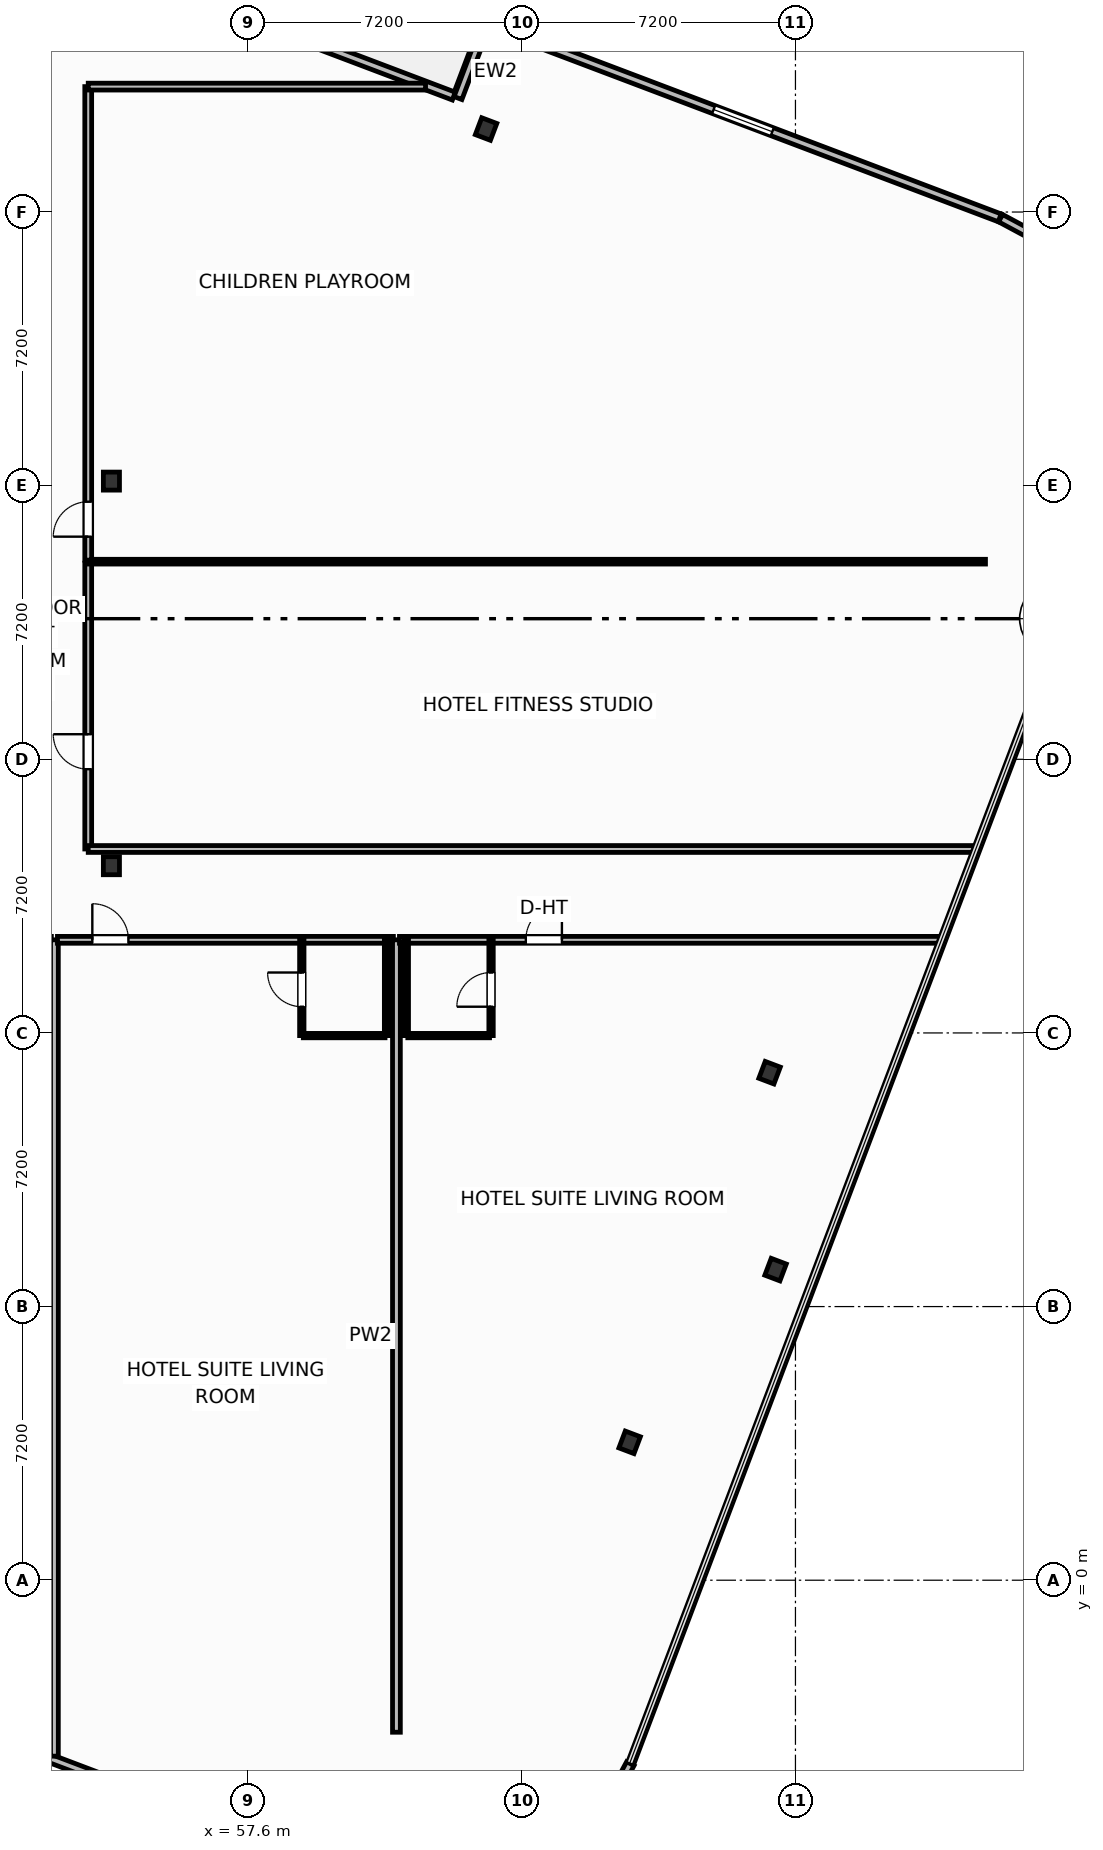
"""IFC4 building model, lengths in metres.
Left out: names, types, materials, properties, quantities, classifications, styles, units other than length and angle.
Written with IfcOpenShell. Run it as: python <this file> out.ifc"""

import sys

from ifc_helpers import new_model, si_unit, direction, frame, frame_2d, origin, origin_2d, place, context, subcontext, project, spatial, rectangle, i_section, extrude, element, fill, save


model = new_model("IFC4")
c1 = context("Model", 3, precision=1e-05, world=origin(), true_north=direction((0.0, 1.0)))
c2 = subcontext(c1, "Body", "Model", "MODEL_VIEW")
j1 = project(units=[si_unit("LENGTHUNIT", "METRE"), si_unit("PLANEANGLEUNIT", "RADIAN")], contexts=[c1])
p1 = place(None, origin())
s1 = spatial("IfcSite", under=j1, at=p1, CompositionType="ELEMENT")
p2 = place(p1, origin())
s2 = spatial("IfcBuilding", under=s1, at=p2, CompositionType="ELEMENT")
p3 = place(p2, frame((0.0, 0.0, 83.6)))
s3 = spatial("IfcBuildingStorey", under=s2, at=p3, CompositionType="ELEMENT", Elevation=83.6)
for number, where, z_axis, x_axis in (
    (1, (54.0, 18.8, 0.0), (0.0, 0.0, 1.0), (1.0, 0.0, 0.0)),
    (2, (54.0, 28.92, 0.0), (0.0, 0.0, 1.0), (1.0, 0.0, 0.0)),
    (3, (67.637, 3.628, 0.0), (0.0, 0.0, 1.0), (0.935, -0.354, 0.0)),
    (4, (71.477, 8.173, 0.0), (0.0, 0.0, 1.0), (0.935, -0.354, 0.0)),
    (5, (71.319, 13.354, 0.0), (0.0, 0.0, 1.0), (0.935, -0.354, 0.0)),
    (6, (63.859, 38.184, 0.0), (0.0, 0.0, 1.0), (0.935, -0.354, 0.0)),
):
    element("IfcColumn", number, at=place(p3, frame(where, z_axis=z_axis, x_axis=x_axis)), inside=s3, PredefinedType="COLUMN", context=c2, shape_type="SweptSolid", body=[
        extrude(i_section(OverallWidth=0.424, OverallDepth=0.474, WebThickness=0.048, FlangeThickness=0.077, FilletRadius=0.025, at=origin_2d()), origin(), (0.0, 0.0, 1.0), 3.7),
    ])
p4 = place(p3, frame((57.399, 41.175, 0.0), z_axis=(0.0, 0.0, 1.0), x_axis=(0.935227640088, -0.354046976001, 0.0)))
e7 = element("IfcWall", 7, at=p4, inside=s3, PredefinedType="SOLIDWALL", context=c2, shape_type="SweptSolid", body=[
    extrude(rectangle(XDim=6.0, YDim=0.22, at=frame_2d((3.0, 0.0))), origin(), (0.0, 0.0, 1.0), 2.73),
])
p5 = place(p4, frame((0.4, 0.0, 0.0)))
e8 = element("IfcOpeningElement", 8, at=p5, cuts=e7, PredefinedType="OPENING", context=c2, shape_type="SweptSolid", body=[
    extrude(rectangle(XDim=1.5, YDim=2.25, at=frame_2d((0.75, 1.125))), frame((0.0, 0.12, 0.0), z_axis=(0.0, -1.0, 0.0), x_axis=(1.0, 0.0, 0.0)), (0.0, 0.0, 1.0), 0.24),
])
p6 = place(p3, frame((47.424, -2.813, 0.0), z_axis=(0.0, 0.0, 1.0), x_axis=(0.935225962032, -0.354051408614, 0.0)))
e9 = element("IfcWall", 9, at=p6, inside=s3, PredefinedType="SOLIDWALL", context=c2, shape_type="SweptSolid", body=[
    extrude(rectangle(XDim=14.347, YDim=0.22, at=frame_2d((7.173, 0.0))), origin(), (0.0, 0.0, 1.0), 2.73),
])
p7 = place(p6, frame((6.348, 0.0, 0.8)))
e10 = element("IfcOpeningElement", 10, at=p7, cuts=e9, PredefinedType="OPENING", context=c2, shape_type="SweptSolid", body=[
    extrude(rectangle(XDim=1.65, YDim=1.65, at=frame_2d((0.825, 0.825))), frame((0.0, 0.12, 0.0), z_axis=(0.0, -1.0, 0.0), x_axis=(1.0, 0.0, 0.0)), (0.0, 0.0, 1.0), 0.24),
])
p8 = place(p3, frame((67.015, -6.019, 0.0), z_axis=(0.0, 0.0, 1.0), x_axis=(0.473077364598, 0.881020889142, 0.0)))
e11 = element("IfcWall", 11, at=p8, inside=s3, PredefinedType="SOLIDWALL", context=c2, shape_type="SweptSolid", body=[
    extrude(rectangle(XDim=1.353, YDim=0.22, at=frame_2d((0.677, 0.0))), origin(), (0.0, 0.0, 1.0), 2.73),
])
p9 = place(p3, frame((78.597, 35.194, 0.0), z_axis=(0.0, 0.0, 1.0), x_axis=(-0.880948732004, 0.473211719614, 0.0)))
e12 = element("IfcWall", 12, at=p9, inside=s3, PredefinedType="SOLIDWALL", context=c2, shape_type="SweptSolid", body=[
    extrude(rectangle(XDim=1.361, YDim=0.22, at=frame_2d((0.681, 0.0))), origin(), (0.0, 0.0, 1.0), 2.73),
])
p10 = place(p3, frame((77.375, 35.847, 0.0), z_axis=(0.0, 0.0, 1.0), x_axis=(-0.935222448475, 0.354060689526, 0.0)))
e13 = element("IfcWall", 13, at=p10, inside=s3, PredefinedType="SOLIDWALL", context=c2, shape_type="SweptSolid", body=[
    extrude(rectangle(XDim=14.447, YDim=0.22, at=frame_2d((7.224, 0.0))), origin(), (0.0, 0.0, 1.0), 2.73),
])
p11 = place(p10, frame((6.399, 0.0, 0.8)))
e14 = element("IfcOpeningElement", 14, at=p11, cuts=e13, PredefinedType="OPENING", context=c2, shape_type="SweptSolid", body=[
    extrude(rectangle(XDim=1.65, YDim=1.65, at=frame_2d((0.825, 0.825))), frame((0.0, 0.12, 0.0), z_axis=(0.0, -1.0, 0.0), x_axis=(1.0, 0.0, 0.0)), (0.0, 0.0, 1.0), 0.24),
])
p12 = place(p3, frame((63.819, 40.845, 0.0), z_axis=(0.0, 0.0, 1.0), x_axis=(-0.354128791944, -0.935196663123, 0.0)))
e15 = element("IfcWall", 15, at=p12, inside=s3, PredefinedType="SOLIDWALL", context=c2, shape_type="SweptSolid", body=[
    extrude(rectangle(XDim=1.975, YDim=0.22, at=frame_2d((0.988, 0.0))), origin(), (0.0, 0.0, 1.0), 2.73),
])
p13 = place(p3, frame((52.5, -4.63, 0.0), z_axis=(0.0, 0.0, 1.0), x_axis=(0.0, 1.0, 0.0)))
e16 = element("IfcWall", 16, at=p13, inside=s3, PredefinedType="PARTITIONING", context=c2, shape_type="SweptSolid", body=[
    extrude(rectangle(XDim=21.48, YDim=0.205, at=frame_2d((10.74, 0.0))), origin(), (0.0, 0.0, 1.0), 2.58),
])
p14 = place(p3, frame((52.58, 16.85, 0.0), z_axis=(0.0, 0.0, 1.0), x_axis=(1.0, 0.0, 0.0)))
e17 = element("IfcWall", 17, at=p14, inside=s3, PredefinedType="PARTITIONING", context=c2, shape_type="SweptSolid", body=[
    extrude(rectangle(XDim=8.84, YDim=0.18, at=frame_2d((4.42, 0.0))), origin(), (0.0, 0.0, 1.0), 2.58),
])
p15 = place(p14, frame((0.918, 0.0, 0.0)))
e18 = element("IfcOpeningElement", 18, at=p15, cuts=e17, PredefinedType="OPENING", context=c2, shape_type="SweptSolid", body=[
    extrude(rectangle(XDim=0.95, YDim=2.15, at=frame_2d((0.475, 1.075))), frame((0.0, 0.1, 0.0), z_axis=(0.0, -1.0, 0.0), x_axis=(1.0, 0.0, 0.0)), (0.0, 0.0, 1.0), 0.2),
])
p16 = place(p3, frame((59.05, 14.33, 0.0), z_axis=(0.0, 0.0, 1.0), x_axis=(1.0, 0.0, 0.0)))
e19 = element("IfcWall", 19, at=p16, inside=s3, PredefinedType="PARTITIONING", context=c2, shape_type="SweptSolid", body=[
    extrude(rectangle(XDim=2.15, YDim=0.115, at=frame_2d((1.075, 0.0))), origin(), (0.0, 0.0, 1.0), 3.45),
])
p17 = place(p3, frame((59.01, 14.33, 0.0), z_axis=(0.0, 0.0, 1.0), x_axis=(0.0, 1.0, 0.0)))
e20 = element("IfcWall", 20, at=p17, inside=s3, PredefinedType="PARTITIONING", context=c2, shape_type="SweptSolid", body=[
    extrude(rectangle(XDim=2.52, YDim=0.115, at=frame_2d((1.26, 0.0))), origin(), (0.0, 0.0, 1.0), 3.45),
])
p18 = place(p17, frame((0.76, 0.0, 0.0)))
e21 = element("IfcOpeningElement", 21, at=p18, cuts=e20, PredefinedType="OPENING", context=c2, shape_type="SweptSolid", body=[
    extrude(rectangle(XDim=0.9, YDim=2.05, at=frame_2d((0.45, 1.025))), frame((0.0, 0.067, 0.0), z_axis=(0.0, -1.0, 0.0), x_axis=(1.0, 0.0, 0.0)), (0.0, 0.0, 1.0), 0.135),
])
p19 = place(p3, frame((61.24, 14.33, 0.0), z_axis=(0.0, 0.0, 1.0), x_axis=(0.0, 1.0, 0.0)))
e22 = element("IfcWall", 22, at=p19, inside=s3, PredefinedType="PARTITIONING", context=c2, shape_type="SweptSolid", body=[
    extrude(rectangle(XDim=2.52, YDim=0.115, at=frame_2d((1.26, 0.0))), origin(), (0.0, 0.0, 1.0), 3.45),
])
p20 = place(p3, frame((61.5, -4.0, 0.0), z_axis=(0.0, 0.0, 1.0), x_axis=(0.0, 1.0, 0.0)))
e23 = element("IfcWall", 23, at=p20, inside=s3, PredefinedType="PARTITIONING", context=c2, shape_type="SweptSolid", body=[
    extrude(rectangle(XDim=20.85, YDim=0.205, at=frame_2d((10.425, 0.0))), origin(), (0.0, 0.0, 1.0), 3.45),
])
p21 = place(p3, frame((61.58, 16.85, 0.0), z_axis=(0.0, 0.0, 1.0), x_axis=(1.0, 0.0, 0.0)))
e24 = element("IfcWall", 24, at=p21, inside=s3, PredefinedType="PARTITIONING", context=c2, shape_type="SweptSolid", body=[
    extrude(rectangle(XDim=14.222, YDim=0.18, at=frame_2d((7.111, 0.0))), origin(), (0.0, 0.0, 1.0), 3.45),
])
p22 = place(p21, frame((3.325, 0.0, 0.0)))
e25 = element("IfcOpeningElement", 25, at=p22, cuts=e24, PredefinedType="OPENING", context=c2, shape_type="SweptSolid", body=[
    extrude(rectangle(XDim=0.95, YDim=2.15, at=frame_2d((0.475, 1.075))), frame((0.0, 0.1, 0.0), z_axis=(0.0, -1.0, 0.0), x_axis=(1.0, 0.0, 0.0)), (0.0, 0.0, 1.0), 0.2),
])
p23 = place(p3, frame((61.8, 14.33, 0.0), z_axis=(0.0, 0.0, 1.0), x_axis=(1.0, 0.0, 0.0)))
e26 = element("IfcWall", 26, at=p23, inside=s3, PredefinedType="PARTITIONING", context=c2, shape_type="SweptSolid", body=[
    extrude(rectangle(XDim=2.15, YDim=0.115, at=frame_2d((1.075, 0.0))), origin(), (0.0, 0.0, 1.0), 3.45),
])
p24 = place(p3, frame((63.99, 14.33, 0.0), z_axis=(0.0, 0.0, 1.0), x_axis=(0.0, 1.0, 0.0)))
e27 = element("IfcWall", 27, at=p24, inside=s3, PredefinedType="PARTITIONING", context=c2, shape_type="SweptSolid", body=[
    extrude(rectangle(XDim=2.52, YDim=0.115, at=frame_2d((1.26, 0.0))), origin(), (0.0, 0.0, 1.0), 3.45),
])
p25 = place(p24, frame((0.76, 0.0, 0.0)))
e28 = element("IfcOpeningElement", 28, at=p25, cuts=e27, PredefinedType="OPENING", context=c2, shape_type="SweptSolid", body=[
    extrude(rectangle(XDim=0.9, YDim=2.05, at=frame_2d((0.45, 1.025))), frame((0.0, 0.067, 0.0), z_axis=(0.0, -1.0, 0.0), x_axis=(1.0, 0.0, 0.0)), (0.0, 0.0, 1.0), 0.135),
])
p26 = place(p3, frame((61.76, 14.33, 0.0), z_axis=(0.0, 0.0, 1.0), x_axis=(0.0, 1.0, 0.0)))
e29 = element("IfcWall", 29, at=p26, inside=s3, PredefinedType="PARTITIONING", context=c2, shape_type="SweptSolid", body=[
    extrude(rectangle(XDim=2.52, YDim=0.115, at=frame_2d((1.26, 0.0))), origin(), (0.0, 0.0, 1.0), 3.45),
])
p27 = place(p3, frame((53.39, 19.24, 0.0), z_axis=(0.0, 0.0, 1.0), x_axis=(0.0, 1.0, 0.0)))
e30 = element("IfcWall", 30, at=p27, inside=s3, PredefinedType="PARTITIONING", context=c2, shape_type="SweptSolid", body=[
    extrude(rectangle(XDim=7.52, YDim=0.18, at=frame_2d((3.76, 0.0))), origin(), (0.0, 0.0, 1.0), 3.45),
])
p28 = place(p27, frame((2.1, 0.0, 0.0)))
e31 = element("IfcOpeningElement", 31, at=p28, cuts=e30, PredefinedType="OPENING", context=c2, shape_type="SweptSolid", body=[
    extrude(rectangle(XDim=0.92, YDim=2.05, at=frame_2d((0.46, 1.025))), frame((0.0, 0.1, 0.0), z_axis=(0.0, -1.0, 0.0), x_axis=(1.0, 0.0, 0.0)), (0.0, 0.0, 1.0), 0.2),
])
p29 = place(p3, frame((53.39, 26.8, 0.0), z_axis=(0.0, 0.0, 1.0), x_axis=(1.0, 0.0, 0.0)))
e32 = element("IfcWall", 32, at=p29, inside=s3, PredefinedType="PARTITIONING", context=c2, shape_type="SweptSolid", body=[
    extrude(rectangle(XDim=23.61, YDim=0.125, at=frame_2d((11.805, 0.0))), origin(), (0.0, 0.0, 1.0), 3.45),
])
p30 = place(p3, frame((53.39, 19.24, 0.0), z_axis=(0.0, 0.0, 1.0), x_axis=(1.0, 0.0, 0.0)))
e33 = element("IfcWall", 33, at=p30, inside=s3, PredefinedType="PARTITIONING", context=c2, shape_type="SweptSolid", body=[
    extrude(rectangle(XDim=23.317, YDim=0.18, at=frame_2d((11.658, 0.0))), origin(), (0.0, 0.0, 1.0), 3.45),
])
p31 = place(p3, frame((53.39, 26.84, 0.0), z_axis=(0.0, 0.0, 1.0), x_axis=(0.0, 1.0, 0.0)))
e34 = element("IfcWall", 34, at=p31, inside=s3, PredefinedType="PARTITIONING", context=c2, shape_type="SweptSolid", body=[
    extrude(rectangle(XDim=12.46, YDim=0.18, at=frame_2d((6.23, 0.0))), origin(), (0.0, 0.0, 1.0), 3.45),
])
p32 = place(p31, frame((0.618, 0.0, 0.0)))
e35 = element("IfcOpeningElement", 35, at=p32, cuts=e34, PredefinedType="OPENING", context=c2, shape_type="SweptSolid", body=[
    extrude(rectangle(XDim=0.92, YDim=2.05, at=frame_2d((0.46, 1.025))), frame((0.0, 0.1, 0.0), z_axis=(0.0, -1.0, 0.0), x_axis=(1.0, 0.0, 0.0)), (0.0, 0.0, 1.0), 0.2),
])
p33 = place(p3, frame((53.39, 39.3, 0.0), z_axis=(0.0, 0.0, 1.0), x_axis=(1.0, 0.0, 0.0)))
e36 = element("IfcWall", 36, at=p33, inside=s3, PredefinedType="PARTITIONING", context=c2, shape_type="SweptSolid", body=[
    extrude(rectangle(XDim=8.876, YDim=0.18, at=frame_2d((4.438, 0.0))), origin(), (0.0, 0.0, 1.0), 3.45),
])
p34 = place(p11, origin())
e37 = element("IfcWindow", 37, at=p34, inside=s3, PartitioningType="SINGLE_PANEL", PredefinedType="WINDOW", context=c2, shape_type="SweptSolid", body=[
    extrude(rectangle(XDim=1.65, YDim=1.65, at=frame_2d((0.825, 0.825))), frame((0.0, 0.03, 0.0), z_axis=(0.0, -1.0, 0.0), x_axis=(1.0, 0.0, 0.0)), (0.0, 0.0, 1.0), 0.06),
])
fill(e14, e37)
p35 = place(p15, origin())
e38 = element("IfcDoor", 38, at=p35, inside=s3, OperationType="SINGLE_SWING_LEFT", PredefinedType="DOOR", context=c2, shape_type="SweptSolid", body=[
    extrude(rectangle(XDim=0.95, YDim=2.15, at=frame_2d((0.475, 1.075))), frame((0.0, 0.025, 0.0), z_axis=(0.0, -1.0, 0.0), x_axis=(1.0, 0.0, 0.0)), (0.0, 0.0, 1.0), 0.05),
])
fill(e18, e38)
p36 = place(p18, origin())
e39 = element("IfcDoor", 39, at=p36, inside=s3, OperationType="SINGLE_SWING_RIGHT", PredefinedType="DOOR", context=c2, shape_type="SweptSolid", body=[
    extrude(rectangle(XDim=0.9, YDim=2.05, at=frame_2d((0.45, 1.025))), frame((0.0, 0.025, 0.0), z_axis=(0.0, -1.0, 0.0), x_axis=(1.0, 0.0, 0.0)), (0.0, 0.0, 1.0), 0.05),
])
fill(e21, e39)
p37 = place(p22, origin())
e40 = element("IfcDoor", 40, at=p37, inside=s3, OperationType="SINGLE_SWING_RIGHT", PredefinedType="DOOR", context=c2, shape_type="SweptSolid", body=[
    extrude(rectangle(XDim=0.95, YDim=2.15, at=frame_2d((0.475, 1.075))), frame((0.0, 0.025, 0.0), z_axis=(0.0, -1.0, 0.0), x_axis=(1.0, 0.0, 0.0)), (0.0, 0.0, 1.0), 0.05),
])
fill(e25, e40)
p38 = place(p25, origin())
e41 = element("IfcDoor", 41, at=p38, inside=s3, OperationType="SINGLE_SWING_LEFT", PredefinedType="DOOR", context=c2, shape_type="SweptSolid", body=[
    extrude(rectangle(XDim=0.9, YDim=2.05, at=frame_2d((0.45, 1.025))), frame((0.0, 0.025, 0.0), z_axis=(0.0, -1.0, 0.0), x_axis=(1.0, 0.0, 0.0)), (0.0, 0.0, 1.0), 0.05),
])
fill(e28, e41)
p39 = place(p28, origin())
e42 = element("IfcDoor", 42, at=p39, inside=s3, OperationType="SINGLE_SWING_RIGHT", PredefinedType="DOOR", context=c2, shape_type="SweptSolid", body=[
    extrude(rectangle(XDim=0.92, YDim=2.05, at=frame_2d((0.46, 1.025))), frame((0.0, 0.025, 0.0), z_axis=(0.0, -1.0, 0.0), x_axis=(1.0, 0.0, 0.0)), (0.0, 0.0, 1.0), 0.05),
])
fill(e31, e42)
p40 = place(p32, origin())
e43 = element("IfcDoor", 43, at=p40, inside=s3, OperationType="SINGLE_SWING_LEFT", PredefinedType="DOOR", context=c2, shape_type="SweptSolid", body=[
    extrude(rectangle(XDim=0.92, YDim=2.05, at=frame_2d((0.46, 1.025))), frame((0.0, 0.025, 0.0), z_axis=(0.0, -1.0, 0.0), x_axis=(1.0, 0.0, 0.0)), (0.0, 0.0, 1.0), 0.05),
])
fill(e35, e43)
save(model, sys.argv[1])
